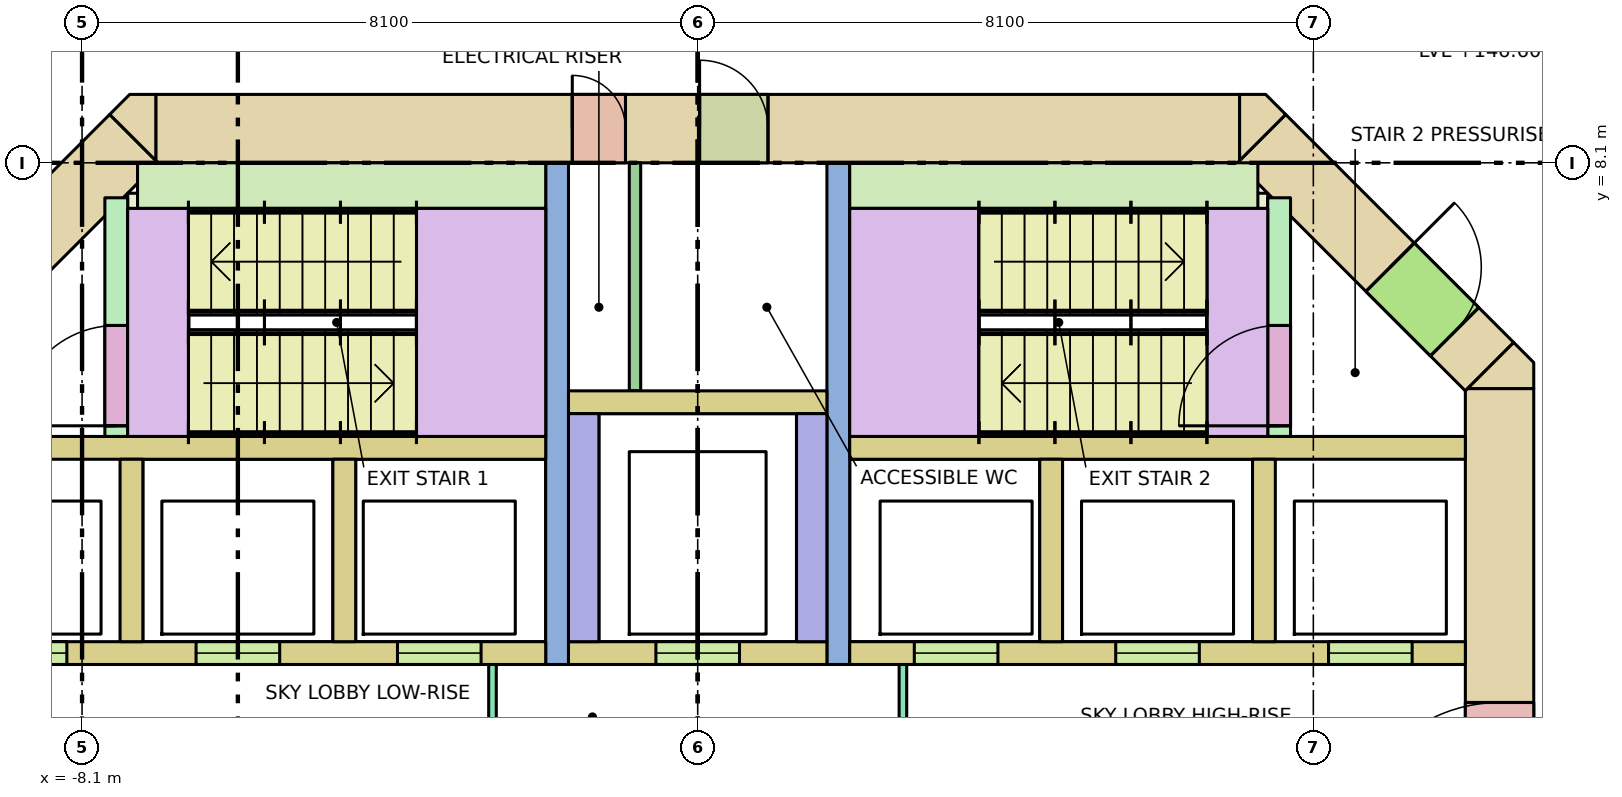
"""IFC4 building model, lengths in metres.
Left out: names, types, materials, properties, quantities, classifications, styles, units other than length and angle.
Written with IfcOpenShell. Run it as: python <this file> out.ifc"""

import sys

from ifc_helpers import new_model, si_unit, direction, frame, frame_2d, origin, place, context, subcontext, project, spatial, polyline, rectangle, outline, extrude, element, fill, save


model = new_model("IFC4")
c1 = context("Model", 3, precision=1e-05, world=origin(), true_north=direction((0.0, 1.0)))
c2 = subcontext(c1, "Body", "Model", "MODEL_VIEW")
j1 = project(units=[si_unit("LENGTHUNIT", "METRE"), si_unit("PLANEANGLEUNIT", "RADIAN")], contexts=[c1])
p1 = place(None, origin())
s1 = spatial("IfcSite", under=j1, at=p1, CompositionType="ELEMENT")
p2 = place(p1, origin())
s2 = spatial("IfcBuilding", under=s1, at=p2, CompositionType="ELEMENT")
p3 = place(p2, frame((0.0, 0.0, 146.6)))
s3 = spatial("IfcBuildingStorey", under=s2, at=p3, CompositionType="ELEMENT", Elevation=146.6)
p4 = place(p3, frame((-7.13, 8.55, -0.28), z_axis=(0.0, 0.0, 1.0), x_axis=(1.0, 0.0, 0.0)))
e1 = element("IfcWall", 1, at=p4, inside=s3, PredefinedType="SHEAR", context=c2, shape_type="SweptSolid", body=[
    extrude(rectangle(XDim=14.26, YDim=0.9, at=frame_2d((7.13, 0.0))), origin(), (0.0, 0.0, 1.0), 7.6),
])
p5 = place(p4, frame((5.48, 0.0, 0.28)))
e2 = element("IfcOpeningElement", 2, at=p5, cuts=e1, PredefinedType="OPENING", context=c2, shape_type="SweptSolid", body=[
    extrude(rectangle(XDim=0.7, YDim=2.1, at=frame_2d((0.35, 1.05))), frame((0.0, 0.46, 0.0), z_axis=(0.0, -1.0, 0.0), x_axis=(1.0, 0.0, 0.0)), (0.0, 0.0, 1.0), 0.92),
])
p6 = place(p4, frame((7.155, 0.0, 0.28)))
e3 = element("IfcOpeningElement", 3, at=p6, cuts=e1, PredefinedType="OPENING", context=c2, shape_type="SweptSolid", body=[
    extrude(rectangle(XDim=0.9, YDim=2.1, at=frame_2d((0.45, 1.05))), frame((0.0, 0.46, 0.0), z_axis=(0.0, -1.0, 0.0), x_axis=(1.0, 0.0, 0.0)), (0.0, 0.0, 1.0), 0.92),
])
p7 = place(p3, frame((10.55, -5.13, -0.28), z_axis=(0.0, 0.0, 1.0), x_axis=(0.0, 1.0, 0.0)))
e4 = element("IfcWall", 4, at=p7, inside=s3, PredefinedType="SHEAR", context=c2, shape_type="SweptSolid", body=[
    extrude(rectangle(XDim=10.26, YDim=0.9, at=frame_2d((5.13, 0.0))), origin(), (0.0, 0.0, 1.0), 7.6),
])
p8 = place(p7, frame((4.13, 0.0, 0.28)))
e5 = element("IfcOpeningElement", 5, at=p8, cuts=e4, PredefinedType="OPENING", context=c2, shape_type="SweptSolid", body=[
    extrude(rectangle(XDim=2.0, YDim=2.1, at=frame_2d((1.0, 1.05))), frame((0.0, 0.46, 0.0), z_axis=(0.0, -1.0, 0.0), x_axis=(1.0, 0.0, 0.0)), (0.0, 0.0, 1.0), 0.92),
])
p9 = place(p3, frame((-10.418, 5.418, -0.28), z_axis=(0.0, 0.0, 1.0), x_axis=(0.707106781187, 0.707106781187, 0.0)))
e6 = element("IfcWall", 6, at=p9, inside=s3, PredefinedType="SHEAR", context=c2, shape_type="SweptSolid", body=[
    extrude(rectangle(XDim=4.243, YDim=0.9, at=frame_2d((2.121, 0.0))), origin(), (0.0, 0.0, 1.0), 7.6),
])
p10 = place(p9, frame((0.65, 0.0, 0.28)))
e7 = element("IfcOpeningElement", 7, at=p10, cuts=e6, PredefinedType="OPENING", context=c2, shape_type="SweptSolid", body=[
    extrude(rectangle(XDim=1.2, YDim=2.1, at=frame_2d((0.6, 1.05))), frame((0.0, 0.46, 0.0), z_axis=(0.0, -1.0, 0.0), x_axis=(1.0, 0.0, 0.0)), (0.0, 0.0, 1.0), 0.92),
])
p11 = place(p3, frame((7.418, 8.418, -0.28), z_axis=(0.0, 0.0, 1.0), x_axis=(0.707106781187, -0.707106781187, 0.0)))
e8 = element("IfcWall", 8, at=p11, inside=s3, PredefinedType="SHEAR", context=c2, shape_type="SweptSolid", body=[
    extrude(rectangle(XDim=4.243, YDim=0.9, at=frame_2d((2.121, 0.0))), origin(), (0.0, 0.0, 1.0), 7.6),
])
p12 = place(p11, frame((2.393, 0.0, 0.28)))
e9 = element("IfcOpeningElement", 9, at=p12, cuts=e8, PredefinedType="OPENING", context=c2, shape_type="SweptSolid", body=[
    extrude(rectangle(XDim=1.2, YDim=2.1, at=frame_2d((0.6, 1.05))), frame((0.0, 0.46, 0.0), z_axis=(0.0, -1.0, 0.0), x_axis=(1.0, 0.0, 0.0)), (0.0, 0.0, 1.0), 0.92),
])
p13 = place(p3, frame((0.0, 0.0, -0.28)))
e10 = element("IfcWall", 10, at=p13, inside=s3, PredefinedType="SHEAR", context=c2, shape_type="SweptSolid", body=[
    extrude(outline(polyline([(11.0, 5.473), (11.0, 5.13), (10.13, 5.13), (10.736, 5.736), (11.0, 5.473)])), origin(), (0.0, 0.0, 1.0), 7.6),
])
p14 = place(p3, frame((0.0, 0.0, -0.28)))
e11 = element("IfcWall", 11, at=p14, inside=s3, PredefinedType="SHEAR", context=c2, shape_type="SweptSolid", body=[
    extrude(outline(polyline([(-7.473, 9.0), (-7.13, 9.0), (-7.13, 8.13), (-7.736, 8.736), (-7.473, 9.0)])), origin(), (0.0, 0.0, 1.0), 7.6),
])
p15 = place(p3, frame((0.0, 0.0, -0.28)))
e12 = element("IfcWall", 12, at=p15, inside=s3, PredefinedType="SHEAR", context=c2, shape_type="SweptSolid", body=[
    extrude(outline(polyline([(7.473, 9.0), (7.736, 8.736), (7.13, 8.13), (7.13, 9.0), (7.473, 9.0)])), origin(), (0.0, 0.0, 1.0), 7.6),
])
for number, where, z_axis, x_axis in (
    (13, (-10.1, 4.35, 0.0), (0.0, 0.0, 1.0), (1.0, 0.0, 0.0)),
    (14, (2.0, 4.35, 0.0), (0.0, 0.0, 1.0), (1.0, 0.0, 0.0)),
):
    element("IfcWall", number, at=place(p3, frame(where, z_axis=z_axis, x_axis=x_axis)), inside=s3, PredefinedType="SOLIDWALL", context=c2, shape_type="SweptSolid", body=[
        extrude(rectangle(XDim=8.1, YDim=0.3, at=frame_2d((4.05, 0.0))), origin(), (0.0, 0.0, 1.0), 7.32),
    ])
p16 = place(p3, frame((-10.1, 1.65, 0.0), z_axis=(0.0, 0.0, 1.0), x_axis=(1.0, 0.0, 0.0)))
e15 = element("IfcWall", 15, at=p16, inside=s3, PredefinedType="SOLIDWALL", context=c2, shape_type="SweptSolid", body=[
    extrude(rectangle(XDim=8.1, YDim=0.3, at=frame_2d((4.05, 0.0))), origin(), (0.0, 0.0, 1.0), 7.32),
])
p17 = place(p16, frame((0.7, 0.0, 0.0)))
e16 = element("IfcOpeningElement", 16, at=p17, cuts=e15, PredefinedType="OPENING", context=c2, shape_type="SweptSolid", body=[
    extrude(rectangle(XDim=1.1, YDim=2.1, at=frame_2d((0.55, 1.05))), frame((0.0, 0.16, 0.0), z_axis=(0.0, -1.0, 0.0), x_axis=(1.0, 0.0, 0.0)), (0.0, 0.0, 1.0), 0.32),
])
p18 = place(p16, frame((3.5, 0.0, 0.0)))
e17 = element("IfcOpeningElement", 17, at=p18, cuts=e15, PredefinedType="OPENING", context=c2, shape_type="SweptSolid", body=[
    extrude(rectangle(XDim=1.1, YDim=2.1, at=frame_2d((0.55, 1.05))), frame((0.0, 0.16, 0.0), z_axis=(0.0, -1.0, 0.0), x_axis=(1.0, 0.0, 0.0)), (0.0, 0.0, 1.0), 0.32),
])
p19 = place(p16, frame((6.15, 0.0, 0.0)))
e18 = element("IfcOpeningElement", 18, at=p19, cuts=e15, PredefinedType="OPENING", context=c2, shape_type="SweptSolid", body=[
    extrude(rectangle(XDim=1.1, YDim=2.1, at=frame_2d((0.55, 1.05))), frame((0.0, 0.16, 0.0), z_axis=(0.0, -1.0, 0.0), x_axis=(1.0, 0.0, 0.0)), (0.0, 0.0, 1.0), 0.32),
])
p20 = place(p3, frame((2.0, 1.65, 0.0), z_axis=(0.0, 0.0, 1.0), x_axis=(1.0, 0.0, 0.0)))
e19 = element("IfcWall", 19, at=p20, inside=s3, PredefinedType="SOLIDWALL", context=c2, shape_type="SweptSolid", body=[
    extrude(rectangle(XDim=8.1, YDim=0.3, at=frame_2d((4.05, 0.0))), origin(), (0.0, 0.0, 1.0), 7.32),
])
p21 = place(p20, frame((0.85, 0.0, 0.0)))
e20 = element("IfcOpeningElement", 20, at=p21, cuts=e19, PredefinedType="OPENING", context=c2, shape_type="SweptSolid", body=[
    extrude(rectangle(XDim=1.1, YDim=2.1, at=frame_2d((0.55, 1.05))), frame((0.0, 0.16, 0.0), z_axis=(0.0, -1.0, 0.0), x_axis=(1.0, 0.0, 0.0)), (0.0, 0.0, 1.0), 0.32),
])
p22 = place(p20, frame((3.5, 0.0, 0.0)))
e21 = element("IfcOpeningElement", 21, at=p22, cuts=e19, PredefinedType="OPENING", context=c2, shape_type="SweptSolid", body=[
    extrude(rectangle(XDim=1.1, YDim=2.1, at=frame_2d((0.55, 1.05))), frame((0.0, 0.16, 0.0), z_axis=(0.0, -1.0, 0.0), x_axis=(1.0, 0.0, 0.0)), (0.0, 0.0, 1.0), 0.32),
])
p23 = place(p20, frame((6.3, 0.0, 0.0)))
e22 = element("IfcOpeningElement", 22, at=p23, cuts=e19, PredefinedType="OPENING", context=c2, shape_type="SweptSolid", body=[
    extrude(rectangle(XDim=1.1, YDim=2.1, at=frame_2d((0.55, 1.05))), frame((0.0, 0.16, 0.0), z_axis=(0.0, -1.0, 0.0), x_axis=(1.0, 0.0, 0.0)), (0.0, 0.0, 1.0), 0.32),
])
for number, where, z_axis, x_axis in (
    (23, (-7.45, 1.8, 0.0), (0.0, 0.0, 1.0), (0.0, 1.0, 0.0)),
    (24, (-4.65, 1.8, 0.0), (0.0, 0.0, 1.0), (0.0, 1.0, 0.0)),
    (25, (4.65, 1.8, 0.0), (0.0, 0.0, 1.0), (0.0, 1.0, 0.0)),
    (26, (7.45, 1.8, 0.0), (0.0, 0.0, 1.0), (0.0, 1.0, 0.0)),
):
    element("IfcWall", number, at=place(p3, frame(where, z_axis=z_axis, x_axis=x_axis)), inside=s3, PredefinedType="SOLIDWALL", context=c2, shape_type="SweptSolid", body=[
        extrude(rectangle(XDim=2.4, YDim=0.3, at=frame_2d((1.2, 0.0))), origin(), (0.0, 0.0, 1.0), 7.32),
    ])
for number, where, z_axis, x_axis in (
    (27, (-1.85, 1.5, 0.0), (0.0, 0.0, 1.0), (0.0, 1.0, 0.0)),
    (28, (1.85, 1.5, 0.0), (0.0, 0.0, 1.0), (0.0, 1.0, 0.0)),
):
    element("IfcWall", number, at=place(p3, frame(where, z_axis=z_axis, x_axis=x_axis)), inside=s3, PredefinedType="SHEAR", context=c2, shape_type="SweptSolid", body=[
        extrude(rectangle(XDim=6.6, YDim=0.3, at=frame_2d((3.3, 0.0))), origin(), (0.0, 0.0, 1.0), 7.32),
    ])
p24 = place(p3, frame((-1.7, 1.65, 0.0), z_axis=(0.0, 0.0, 1.0), x_axis=(1.0, 0.0, 0.0)))
e29 = element("IfcWall", 29, at=p24, inside=s3, PredefinedType="SOLIDWALL", context=c2, shape_type="SweptSolid", body=[
    extrude(rectangle(XDim=3.4, YDim=0.3, at=frame_2d((1.7, 0.0))), origin(), (0.0, 0.0, 1.0), 7.32),
])
p25 = place(p24, frame((1.15, 0.0, 0.0)))
e30 = element("IfcOpeningElement", 30, at=p25, cuts=e29, PredefinedType="OPENING", context=c2, shape_type="SweptSolid", body=[
    extrude(rectangle(XDim=1.1, YDim=2.1, at=frame_2d((0.55, 1.05))), frame((0.0, 0.16, 0.0), z_axis=(0.0, -1.0, 0.0), x_axis=(1.0, 0.0, 0.0)), (0.0, 0.0, 1.0), 0.32),
])
for number, where, z_axis, x_axis in (
    (31, (-1.5, 1.8, 0.0), (0.0, 0.0, 1.0), (0.0, 1.0, 0.0)),
    (32, (1.5, 1.8, 0.0), (0.0, 0.0, 1.0), (0.0, 1.0, 0.0)),
):
    element("IfcWall", number, at=place(p3, frame(where, z_axis=z_axis, x_axis=x_axis)), inside=s3, PredefinedType="SOLIDWALL", context=c2, shape_type="SweptSolid", body=[
        extrude(rectangle(XDim=3.0, YDim=0.4, at=frame_2d((1.5, 0.0))), origin(), (0.0, 0.0, 1.0), 7.32),
    ])
p26 = place(p3, frame((-1.7, 4.95, 0.0), z_axis=(0.0, 0.0, 1.0), x_axis=(1.0, 0.0, 0.0)))
e33 = element("IfcWall", 33, at=p26, inside=s3, PredefinedType="SOLIDWALL", context=c2, shape_type="SweptSolid", body=[
    extrude(rectangle(XDim=3.4, YDim=0.3, at=frame_2d((1.7, 0.0))), origin(), (0.0, 0.0, 1.0), 7.32),
])
p27 = place(p3, frame((-7.65, 4.5, 0.0), z_axis=(0.0, 0.0, 1.0), x_axis=(0.0, 1.0, 0.0)))
e34 = element("IfcWall", 34, at=p27, inside=s3, PredefinedType="SHEAR", context=c2, shape_type="SweptSolid", body=[
    extrude(rectangle(XDim=3.14, YDim=0.3, at=frame_2d((1.57, 0.0))), origin(), (0.0, 0.0, 1.0), 7.32),
])
p28 = place(p27, frame((0.14, 0.0, 0.0)))
e35 = element("IfcOpeningElement", 35, at=p28, cuts=e34, PredefinedType="OPENING", context=c2, shape_type="SweptSolid", body=[
    extrude(rectangle(XDim=1.32, YDim=2.1, at=frame_2d((0.66, 1.05))), frame((0.0, 0.16, 0.0), z_axis=(0.0, -1.0, 0.0), x_axis=(1.0, 0.0, 0.0)), (0.0, 0.0, 1.0), 0.32),
])
p29 = place(p3, frame((-7.37, 7.8, 0.0), z_axis=(0.0, 0.0, 1.0), x_axis=(1.0, 0.0, 0.0)))
e36 = element("IfcWall", 36, at=p29, inside=s3, PredefinedType="SHEAR", context=c2, shape_type="SweptSolid", body=[
    extrude(rectangle(XDim=5.37, YDim=0.6, at=frame_2d((2.685, 0.0))), origin(), (0.0, 0.0, 1.0), 7.32),
])
p30 = place(p3, frame((7.65, 4.5, 0.0), z_axis=(0.0, 0.0, 1.0), x_axis=(0.0, 1.0, 0.0)))
e37 = element("IfcWall", 37, at=p30, inside=s3, PredefinedType="SHEAR", context=c2, shape_type="SweptSolid", body=[
    extrude(rectangle(XDim=3.14, YDim=0.3, at=frame_2d((1.57, 0.0))), origin(), (0.0, 0.0, 1.0), 7.32),
])
p31 = place(p30, frame((0.14, 0.0, 0.0)))
e38 = element("IfcOpeningElement", 38, at=p31, cuts=e37, PredefinedType="OPENING", context=c2, shape_type="SweptSolid", body=[
    extrude(rectangle(XDim=1.32, YDim=2.1, at=frame_2d((0.66, 1.05))), frame((0.0, 0.16, 0.0), z_axis=(0.0, -1.0, 0.0), x_axis=(1.0, 0.0, 0.0)), (0.0, 0.0, 1.0), 0.32),
])
p32 = place(p3, frame((2.0, 7.8, 0.0), z_axis=(0.0, 0.0, 1.0), x_axis=(1.0, 0.0, 0.0)))
e39 = element("IfcWall", 39, at=p32, inside=s3, PredefinedType="SHEAR", context=c2, shape_type="SweptSolid", body=[
    extrude(rectangle(XDim=5.37, YDim=0.6, at=frame_2d((2.685, 0.0))), origin(), (0.0, 0.0, 1.0), 7.32),
])
for number, where, z_axis, x_axis in (
    (40, (-7.5, 7.6, 0.0), (0.0, 0.0, 1.0), (1.0, 0.0, 0.0)),
    (41, (6.9, 7.6, 0.0), (0.0, 0.0, 1.0), (1.0, 0.0, 0.0)),
):
    element("IfcWall", number, at=place(p3, frame(where, z_axis=z_axis, x_axis=x_axis)), inside=s3, PredefinedType="SHEAR", context=c2, shape_type="SweptSolid", body=[
        extrude(rectangle(XDim=0.6, YDim=0.2, at=frame_2d((0.3, 0.0))), origin(), (0.0, 0.0, 1.0), 7.32),
    ])
p33 = place(p3, frame((-2.7, -1.5, 0.0), z_axis=(0.0, 0.0, 1.0), x_axis=(0.0, 1.0, 0.0)))
e42 = element("IfcWall", 42, at=p33, inside=s3, PredefinedType="PARTITIONING", context=c2, shape_type="SweptSolid", body=[
    extrude(rectangle(XDim=3.0, YDim=0.1, at=frame_2d((1.5, 0.0))), origin(), (0.0, 0.0, 1.0), 7.32),
])
p34 = place(p33, frame((0.9, 0.0, 0.0)))
e43 = element("IfcOpeningElement", 43, at=p34, cuts=e42, PredefinedType="OPENING", context=c2, shape_type="SweptSolid", body=[
    extrude(rectangle(XDim=1.2, YDim=2.1, at=frame_2d((0.6, 1.05))), frame((0.0, 0.06, 0.0), z_axis=(0.0, -1.0, 0.0), x_axis=(1.0, 0.0, 0.0)), (0.0, 0.0, 1.0), 0.12),
])
p35 = place(p3, frame((2.7, -1.5, 0.0), z_axis=(0.0, 0.0, 1.0), x_axis=(0.0, 1.0, 0.0)))
e44 = element("IfcWall", 44, at=p35, inside=s3, PredefinedType="PARTITIONING", context=c2, shape_type="SweptSolid", body=[
    extrude(rectangle(XDim=3.0, YDim=0.1, at=frame_2d((1.5, 0.0))), origin(), (0.0, 0.0, 1.0), 7.32),
])
p36 = place(p35, frame((0.9, 0.0, 0.0)))
e45 = element("IfcOpeningElement", 45, at=p36, cuts=e44, PredefinedType="OPENING", context=c2, shape_type="SweptSolid", body=[
    extrude(rectangle(XDim=1.2, YDim=2.1, at=frame_2d((0.6, 1.05))), frame((0.0, 0.06, 0.0), z_axis=(0.0, -1.0, 0.0), x_axis=(1.0, 0.0, 0.0)), (0.0, 0.0, 1.0), 0.12),
])
p37 = place(p3, frame((-0.825, 5.1, 0.0), z_axis=(0.0, 0.0, 1.0), x_axis=(0.0, 1.0, 0.0)))
e46 = element("IfcWall", 46, at=p37, inside=s3, PredefinedType="PARTITIONING", context=c2, shape_type="SweptSolid", body=[
    extrude(rectangle(XDim=3.0, YDim=0.15, at=frame_2d((1.5, 0.0))), origin(), (0.0, 0.0, 1.0), 7.32),
])
p38 = place(p3, frame((9.281, 13.238, 0.0), z_axis=(0.0, 0.0, 1.0), x_axis=(0.707106781187, -0.707106781187, 0.0)))
e47 = element("IfcWall", 47, at=p38, inside=s3, PredefinedType="PARTITIONING", context=c2, shape_type="SweptSolid", body=[
    extrude(rectangle(XDim=8.425, YDim=0.15, at=frame_2d((4.212, 0.0))), origin(), (0.0, 0.0, 1.0), 6.52),
])
p39 = place(p38, frame((2.658, 0.0, 0.0)))
e48 = element("IfcOpeningElement", 48, at=p39, cuts=e47, PredefinedType="OPENING", context=c2, shape_type="SweptSolid", body=[
    extrude(rectangle(XDim=1.8, YDim=2.1, at=frame_2d((0.9, 1.05))), frame((0.0, 0.085, 0.0), z_axis=(0.0, -1.0, 0.0), x_axis=(1.0, 0.0, 0.0)), (0.0, 0.0, 1.0), 0.17),
])
p40 = place(p17, origin())
e49 = element("IfcDoor", 49, at=p40, inside=s3, OperationType="DOUBLE_DOOR_SLIDING", PredefinedType="DOOR", context=c2, shape_type="SweptSolid", body=[
    extrude(rectangle(XDim=1.1, YDim=2.1, at=frame_2d((0.55, 1.05))), frame((0.0, 0.025, 0.0), z_axis=(0.0, -1.0, 0.0), x_axis=(1.0, 0.0, 0.0)), (0.0, 0.0, 1.0), 0.05),
])
fill(e16, e49)
p41 = place(p18, origin())
e50 = element("IfcDoor", 50, at=p41, inside=s3, OperationType="DOUBLE_DOOR_SLIDING", PredefinedType="DOOR", context=c2, shape_type="SweptSolid", body=[
    extrude(rectangle(XDim=1.1, YDim=2.1, at=frame_2d((0.55, 1.05))), frame((0.0, 0.025, 0.0), z_axis=(0.0, -1.0, 0.0), x_axis=(1.0, 0.0, 0.0)), (0.0, 0.0, 1.0), 0.05),
])
fill(e17, e50)
p42 = place(p19, origin())
e51 = element("IfcDoor", 51, at=p42, inside=s3, OperationType="DOUBLE_DOOR_SLIDING", PredefinedType="DOOR", context=c2, shape_type="SweptSolid", body=[
    extrude(rectangle(XDim=1.1, YDim=2.1, at=frame_2d((0.55, 1.05))), frame((0.0, 0.025, 0.0), z_axis=(0.0, -1.0, 0.0), x_axis=(1.0, 0.0, 0.0)), (0.0, 0.0, 1.0), 0.05),
])
fill(e18, e51)
p43 = place(p21, origin())
e52 = element("IfcDoor", 52, at=p43, inside=s3, OperationType="DOUBLE_DOOR_SLIDING", PredefinedType="DOOR", context=c2, shape_type="SweptSolid", body=[
    extrude(rectangle(XDim=1.1, YDim=2.1, at=frame_2d((0.55, 1.05))), frame((0.0, 0.025, 0.0), z_axis=(0.0, -1.0, 0.0), x_axis=(1.0, 0.0, 0.0)), (0.0, 0.0, 1.0), 0.05),
])
fill(e20, e52)
p44 = place(p22, origin())
e53 = element("IfcDoor", 53, at=p44, inside=s3, OperationType="DOUBLE_DOOR_SLIDING", PredefinedType="DOOR", context=c2, shape_type="SweptSolid", body=[
    extrude(rectangle(XDim=1.1, YDim=2.1, at=frame_2d((0.55, 1.05))), frame((0.0, 0.025, 0.0), z_axis=(0.0, -1.0, 0.0), x_axis=(1.0, 0.0, 0.0)), (0.0, 0.0, 1.0), 0.05),
])
fill(e21, e53)
p45 = place(p23, origin())
e54 = element("IfcDoor", 54, at=p45, inside=s3, OperationType="DOUBLE_DOOR_SLIDING", PredefinedType="DOOR", context=c2, shape_type="SweptSolid", body=[
    extrude(rectangle(XDim=1.1, YDim=2.1, at=frame_2d((0.55, 1.05))), frame((0.0, 0.025, 0.0), z_axis=(0.0, -1.0, 0.0), x_axis=(1.0, 0.0, 0.0)), (0.0, 0.0, 1.0), 0.05),
])
fill(e22, e54)
p46 = place(p25, origin())
e55 = element("IfcDoor", 55, at=p46, inside=s3, OperationType="DOUBLE_DOOR_SLIDING", PredefinedType="DOOR", context=c2, shape_type="SweptSolid", body=[
    extrude(rectangle(XDim=1.1, YDim=2.1, at=frame_2d((0.55, 1.05))), frame((0.0, 0.025, 0.0), z_axis=(0.0, -1.0, 0.0), x_axis=(1.0, 0.0, 0.0)), (0.0, 0.0, 1.0), 0.05),
])
fill(e30, e55)
p47 = place(p28, origin())
e56 = element("IfcDoor", 56, at=p47, inside=s3, OperationType="DOUBLE_DOOR_SINGLE_SWING", PredefinedType="DOOR", context=c2, shape_type="SweptSolid", body=[
    extrude(rectangle(XDim=1.32, YDim=2.1, at=frame_2d((0.66, 1.05))), frame((0.0, 0.025, 0.0), z_axis=(0.0, -1.0, 0.0), x_axis=(1.0, 0.0, 0.0)), (0.0, 0.0, 1.0), 0.05),
])
fill(e35, e56)
p48 = place(p31, origin())
e57 = element("IfcDoor", 57, at=p48, inside=s3, OperationType="DOUBLE_DOOR_SINGLE_SWING", PredefinedType="DOOR", context=c2, shape_type="SweptSolid", body=[
    extrude(rectangle(XDim=1.32, YDim=2.1, at=frame_2d((0.66, 1.05))), frame((0.0, 0.025, 0.0), z_axis=(0.0, -1.0, 0.0), x_axis=(1.0, 0.0, 0.0)), (0.0, 0.0, 1.0), 0.05),
])
fill(e38, e57)
p49 = place(p12, origin())
e58 = element("IfcDoor", 58, at=p49, inside=s3, OperationType="SINGLE_SWING_LEFT", PredefinedType="DOOR", context=c2, shape_type="SweptSolid", body=[
    extrude(rectangle(XDim=1.2, YDim=2.1, at=frame_2d((0.6, 1.05))), frame((0.0, 0.025, 0.0), z_axis=(0.0, -1.0, 0.0), x_axis=(1.0, 0.0, 0.0)), (0.0, 0.0, 1.0), 0.05),
])
fill(e9, e58)
p50 = place(p8, origin())
e59 = element("IfcDoor", 59, at=p50, inside=s3, OperationType="DOUBLE_DOOR_SINGLE_SWING", PredefinedType="DOOR", context=c2, shape_type="SweptSolid", body=[
    extrude(rectangle(XDim=2.0, YDim=2.1, at=frame_2d((1.0, 1.05))), frame((0.0, 0.025, 0.0), z_axis=(0.0, -1.0, 0.0), x_axis=(1.0, 0.0, 0.0)), (0.0, 0.0, 1.0), 0.05),
])
fill(e5, e59)
p51 = place(p5, origin())
e60 = element("IfcDoor", 60, at=p51, inside=s3, OperationType="SINGLE_SWING_LEFT", PredefinedType="DOOR", context=c2, shape_type="SweptSolid", body=[
    extrude(rectangle(XDim=0.7, YDim=2.1, at=frame_2d((0.35, 1.05))), frame((0.0, 0.025, 0.0), z_axis=(0.0, -1.0, 0.0), x_axis=(1.0, 0.0, 0.0)), (0.0, 0.0, 1.0), 0.05),
])
fill(e2, e60)
p52 = place(p6, origin())
e61 = element("IfcDoor", 61, at=p52, inside=s3, OperationType="SINGLE_SWING_LEFT", PredefinedType="DOOR", context=c2, shape_type="SweptSolid", body=[
    extrude(rectangle(XDim=0.9, YDim=2.1, at=frame_2d((0.45, 1.05))), frame((0.0, 0.025, 0.0), z_axis=(0.0, -1.0, 0.0), x_axis=(1.0, 0.0, 0.0)), (0.0, 0.0, 1.0), 0.05),
])
fill(e3, e61)
save(model, sys.argv[1])
